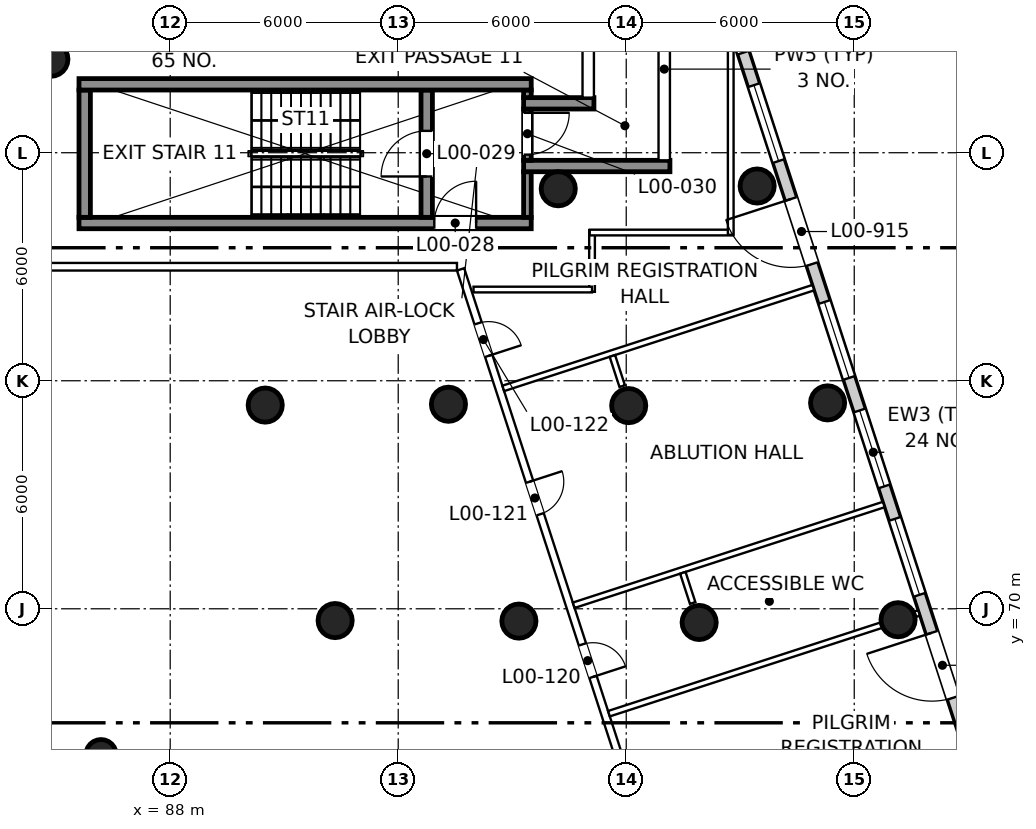
"""IFC4 building model, lengths in metres.
Left out: names, types, materials, properties, quantities, classifications, styles, units other than length and angle.
Written with IfcOpenShell. Run it as: python <this file> out.ifc"""

import sys

from ifc_helpers import new_model, si_unit, direction, frame, frame_2d, origin, origin_2d, place, context, subcontext, project, spatial, rectangle, circle, extrude, element, fill, save


model = new_model("IFC4")
c1 = context("Model", 3, precision=1e-05, world=origin(), true_north=direction((0.0, 1.0)))
c2 = subcontext(c1, "Body", "Model", "MODEL_VIEW")
j1 = project(units=[si_unit("LENGTHUNIT", "METRE"), si_unit("PLANEANGLEUNIT", "RADIAN")], contexts=[c1])
p1 = place(None, origin())
s1 = spatial("IfcSite", under=j1, at=p1, CompositionType="ELEMENT")
p2 = place(p1, origin())
s2 = spatial("IfcBuilding", under=s1, at=p2, CompositionType="ELEMENT")
p3 = place(p2, origin())
s3 = spatial("IfcBuildingStorey", under=s2, at=p3, CompositionType="ELEMENT", Elevation=0.0)
for number, where, z_axis, x_axis in (
    (1, (92.34, 69.69, 0.0), (0.0, 0.0, 1.0), (1.0, 0.0, 0.0)),
    (2, (90.5, 75.36, 0.0), (0.0, 0.0, 1.0), (1.0, 0.0, 0.0)),
    (3, (84.86, 84.46, 0.0), (0.0, 0.0, 1.0), (1.0, 0.0, 0.0)),
):
    element("IfcColumn", number, at=place(p3, frame(where, z_axis=z_axis, x_axis=x_axis)), inside=s3, PredefinedType="COLUMN", context=c2, shape_type="SweptSolid", body=[
        extrude(circle(Radius=0.45, at=origin_2d()), origin(), (0.0, 0.0, 1.0), 9.0),
    ])
p4 = place(p3, frame((86.18, 66.16, 0.0), z_axis=(0.0, 0.0, 1.0), x_axis=(1.0, 0.0, 0.0)))
e4 = element("IfcColumn", 4, at=p4, inside=s3, PredefinedType="COLUMN", context=c2, shape_type="SweptSolid", body=[
    extrude(circle(Radius=0.4, at=origin_2d()), origin(), (0.0, 0.0, 1.0), 9.0),
])
for number, where, z_axis, x_axis in (
    (5, (107.153, 69.712, 0.0), (0.0, 0.0, 1.0), (1.0, 0.0, 0.0)),
    (6, (105.299, 75.418, 0.0), (0.0, 0.0, 1.0), (1.0, 0.0, 0.0)),
    (7, (103.445, 81.124, 0.0), (0.0, 0.0, 1.0), (1.0, 0.0, 0.0)),
    (8, (101.919, 69.64, 0.0), (0.0, 0.0, 1.0), (1.0, 0.0, 0.0)),
    (9, (100.065, 75.346, 0.0), (0.0, 0.0, 1.0), (1.0, 0.0, 0.0)),
    (10, (98.211, 81.052, 0.0), (0.0, 0.0, 1.0), (1.0, 0.0, 0.0)),
    (11, (97.176, 69.676, 0.0), (0.0, 0.0, 1.0), (1.0, 0.0, 0.0)),
    (12, (95.322, 75.382, 0.0), (0.0, 0.0, 1.0), (1.0, 0.0, 0.0)),
):
    element("IfcColumn", number, at=place(p3, frame(where, z_axis=z_axis, x_axis=x_axis)), inside=s3, PredefinedType="COLUMN", context=c2, shape_type="SweptSolid", body=[
        extrude(circle(Radius=0.45, at=origin_2d()), origin(), (0.0, 0.0, 1.0), 9.0),
    ])
p5 = place(p3, frame((110.912, 60.539, 0.0), z_axis=(0.0, 0.0, 1.0), x_axis=(-0.309016476183, 0.951056684666, 0.0)))
e13 = element("IfcWall", 13, at=p5, inside=s3, PredefinedType="SOLIDWALL", context=c2, shape_type="SweptSolid", body=[
    extrude(rectangle(XDim=28.556, YDim=0.32, at=frame_2d((14.278, 0.0))), origin(), (0.0, 0.0, 1.0), 8.65),
])
p6 = place(p5, frame((1.335, 0.0, 0.9)))
e14 = element("IfcOpeningElement", 14, at=p6, cuts=e13, PredefinedType="OPENING", context=c2, shape_type="SweptSolid", body=[
    extrude(rectangle(XDim=2.1, YDim=3.0, at=frame_2d((1.05, 1.5))), frame((0.0, 0.17, 0.0), z_axis=(0.0, -1.0, 0.0), x_axis=(1.0, 0.0, 0.0)), (0.0, 0.0, 1.0), 0.34),
])
p7 = place(p5, frame((4.335, 0.0, 0.9)))
e15 = element("IfcOpeningElement", 15, at=p7, cuts=e13, PredefinedType="OPENING", context=c2, shape_type="SweptSolid", body=[
    extrude(rectangle(XDim=2.1, YDim=3.0, at=frame_2d((1.05, 1.5))), frame((0.0, 0.17, 0.0), z_axis=(0.0, -1.0, 0.0), x_axis=(1.0, 0.0, 0.0)), (0.0, 0.0, 1.0), 0.34),
])
p8 = place(p5, frame((7.485, 0.0, 0.0)))
e16 = element("IfcOpeningElement", 16, at=p8, cuts=e13, PredefinedType="OPENING", context=c2, shape_type="SweptSolid", body=[
    extrude(rectangle(XDim=1.8, YDim=2.4, at=frame_2d((0.9, 1.2))), frame((0.0, 0.17, 0.0), z_axis=(0.0, -1.0, 0.0), x_axis=(1.0, 0.0, 0.0)), (0.0, 0.0, 1.0), 0.34),
])
p9 = place(p5, frame((10.335, 0.0, 0.9)))
e17 = element("IfcOpeningElement", 17, at=p9, cuts=e13, PredefinedType="OPENING", context=c2, shape_type="SweptSolid", body=[
    extrude(rectangle(XDim=2.1, YDim=3.0, at=frame_2d((1.05, 1.5))), frame((0.0, 0.17, 0.0), z_axis=(0.0, -1.0, 0.0), x_axis=(1.0, 0.0, 0.0)), (0.0, 0.0, 1.0), 0.34),
])
p10 = place(p5, frame((13.335, 0.0, 0.9)))
e18 = element("IfcOpeningElement", 18, at=p10, cuts=e13, PredefinedType="OPENING", context=c2, shape_type="SweptSolid", body=[
    extrude(rectangle(XDim=2.1, YDim=3.0, at=frame_2d((1.05, 1.5))), frame((0.0, 0.17, 0.0), z_axis=(0.0, -1.0, 0.0), x_axis=(1.0, 0.0, 0.0)), (0.0, 0.0, 1.0), 0.34),
])
p11 = place(p5, frame((16.335, 0.0, 0.9)))
e19 = element("IfcOpeningElement", 19, at=p11, cuts=e13, PredefinedType="OPENING", context=c2, shape_type="SweptSolid", body=[
    extrude(rectangle(XDim=2.1, YDim=3.0, at=frame_2d((1.05, 1.5))), frame((0.0, 0.17, 0.0), z_axis=(0.0, -1.0, 0.0), x_axis=(1.0, 0.0, 0.0)), (0.0, 0.0, 1.0), 0.34),
])
p12 = place(p5, frame((19.485, 0.0, 0.0)))
e20 = element("IfcOpeningElement", 20, at=p12, cuts=e13, PredefinedType="OPENING", context=c2, shape_type="SweptSolid", body=[
    extrude(rectangle(XDim=1.8, YDim=2.4, at=frame_2d((0.9, 1.2))), frame((0.0, 0.17, 0.0), z_axis=(0.0, -1.0, 0.0), x_axis=(1.0, 0.0, 0.0)), (0.0, 0.0, 1.0), 0.34),
])
p13 = place(p5, frame((22.335, 0.0, 0.9)))
e21 = element("IfcOpeningElement", 21, at=p13, cuts=e13, PredefinedType="OPENING", context=c2, shape_type="SweptSolid", body=[
    extrude(rectangle(XDim=2.1, YDim=3.0, at=frame_2d((1.05, 1.5))), frame((0.0, 0.17, 0.0), z_axis=(0.0, -1.0, 0.0), x_axis=(1.0, 0.0, 0.0)), (0.0, 0.0, 1.0), 0.34),
])
p14 = place(p5, frame((25.335, 0.0, 0.9)))
e22 = element("IfcOpeningElement", 22, at=p14, cuts=e13, PredefinedType="OPENING", context=c2, shape_type="SweptSolid", body=[
    extrude(rectangle(XDim=2.1, YDim=3.0, at=frame_2d((1.05, 1.5))), frame((0.0, 0.17, 0.0), z_axis=(0.0, -1.0, 0.0), x_axis=(1.0, 0.0, 0.0)), (0.0, 0.0, 1.0), 0.34),
])
p15 = place(p3, frame((85.6, 80.15, 0.0), z_axis=(0.0, 0.0, 1.0), x_axis=(1.0, 0.0, 0.0)))
e23 = element("IfcWall", 23, at=p15, inside=s3, PredefinedType="SHEAR", context=c2, shape_type="SweptSolid", body=[
    extrude(rectangle(XDim=11.9, YDim=0.3, at=frame_2d((5.95, 0.0))), origin(), (0.0, 0.0, 1.0), 9.0),
])
p16 = place(p15, frame((9.35, 0.0, 0.0)))
e24 = element("IfcOpeningElement", 24, at=p16, cuts=e23, PredefinedType="OPENING", context=c2, shape_type="SweptSolid", body=[
    extrude(rectangle(XDim=1.1, YDim=2.1, at=frame_2d((0.55, 1.05))), frame((0.0, 0.16, 0.0), z_axis=(0.0, -1.0, 0.0), x_axis=(1.0, 0.0, 0.0)), (0.0, 0.0, 1.0), 0.32),
])
p17 = place(p3, frame((85.75, 80.3, 0.0), z_axis=(0.0, 0.0, 1.0), x_axis=(0.0, 1.0, 0.0)))
e25 = element("IfcWall", 25, at=p17, inside=s3, PredefinedType="SHEAR", context=c2, shape_type="SweptSolid", body=[
    extrude(rectangle(XDim=3.35, YDim=0.3, at=frame_2d((1.675, 0.0))), origin(), (0.0, 0.0, 1.0), 9.0),
])
p18 = place(p3, frame((94.75, 80.3, 0.0), z_axis=(0.0, 0.0, 1.0), x_axis=(0.0, 1.0, 0.0)))
e26 = element("IfcWall", 26, at=p18, inside=s3, PredefinedType="SHEAR", context=c2, shape_type="SweptSolid", body=[
    extrude(rectangle(XDim=3.35, YDim=0.3, at=frame_2d((1.675, 0.0))), origin(), (0.0, 0.0, 1.0), 9.0),
])
p19 = place(p18, frame((1.075, 0.0, 0.0)))
e27 = element("IfcOpeningElement", 27, at=p19, cuts=e26, PredefinedType="OPENING", context=c2, shape_type="SweptSolid", body=[
    extrude(rectangle(XDim=1.2, YDim=2.1, at=frame_2d((0.6, 1.05))), frame((0.0, 0.16, 0.0), z_axis=(0.0, -1.0, 0.0), x_axis=(1.0, 0.0, 0.0)), (0.0, 0.0, 1.0), 0.32),
])
p20 = place(p3, frame((97.4, 80.3, 0.0), z_axis=(0.0, 0.0, 1.0), x_axis=(0.0, 1.0, 0.0)))
e28 = element("IfcWall", 28, at=p20, inside=s3, PredefinedType="SHEAR", context=c2, shape_type="SweptSolid", body=[
    extrude(rectangle(XDim=1.2, YDim=0.2, at=frame_2d((0.6, 0.0))), origin(), (0.0, 0.0, 1.0), 9.0),
])
p21 = place(p3, frame((97.3, 81.65, 0.0), z_axis=(0.0, 0.0, 1.0), x_axis=(1.0, 0.0, 0.0)))
e29 = element("IfcWall", 29, at=p21, inside=s3, PredefinedType="SHEAR", context=c2, shape_type="SweptSolid", body=[
    extrude(rectangle(XDim=3.85, YDim=0.3, at=frame_2d((1.925, 0.0))), origin(), (0.0, 0.0, 1.0), 9.0),
])
p22 = place(p3, frame((97.4, 81.8, 0.0), z_axis=(0.0, 0.0, 1.0), x_axis=(0.0, 1.0, 0.0)))
e30 = element("IfcWall", 30, at=p22, inside=s3, PredefinedType="SHEAR", context=c2, shape_type="SweptSolid", body=[
    extrude(rectangle(XDim=1.35, YDim=0.2, at=frame_2d((0.675, 0.0))), origin(), (0.0, 0.0, 1.0), 9.0),
])
p23 = place(p22, frame((0.15, 0.0, 0.0)))
e31 = element("IfcOpeningElement", 31, at=p23, cuts=e30, PredefinedType="OPENING", context=c2, shape_type="SweptSolid", body=[
    extrude(rectangle(XDim=1.1, YDim=2.1, at=frame_2d((0.55, 1.05))), frame((0.0, 0.11, 0.0), z_axis=(0.0, -1.0, 0.0), x_axis=(1.0, 0.0, 0.0)), (0.0, 0.0, 1.0), 0.22),
])
p24 = place(p3, frame((101.0, 81.8, 0.0), z_axis=(0.0, 0.0, 1.0), x_axis=(0.0, 1.0, 0.0)))
e32 = element("IfcWall", 32, at=p24, inside=s3, PredefinedType="PARTITIONING", context=c2, shape_type="SweptSolid", body=[
    extrude(rectangle(XDim=4.8, YDim=0.3, at=frame_2d((2.4, 0.0))), origin(), (0.0, 0.0, 1.0), 8.65),
])
p25 = place(p3, frame((97.3, 83.3, 0.0), z_axis=(0.0, 0.0, 1.0), x_axis=(1.0, 0.0, 0.0)))
e33 = element("IfcWall", 33, at=p25, inside=s3, PredefinedType="SHEAR", context=c2, shape_type="SweptSolid", body=[
    extrude(rectangle(XDim=1.85, YDim=0.3, at=frame_2d((0.925, 0.0))), origin(), (0.0, 0.0, 1.0), 9.0),
])
p26 = place(p3, frame((97.3, 83.55, 0.0), z_axis=(0.0, 0.0, 1.0), x_axis=(1.0, 0.0, 0.0)))
e34 = element("IfcWall", 34, at=p26, inside=s3, PredefinedType="SHEAR", context=c2, shape_type="SweptSolid", body=[
    extrude(rectangle(XDim=0.2, YDim=0.2, at=frame_2d((0.1, 0.0))), origin(), (0.0, 0.0, 1.0), 9.0),
])
p27 = place(p3, frame((99.0, 83.45, 0.0), z_axis=(0.0, 0.0, 1.0), x_axis=(0.0, 1.0, 0.0)))
e35 = element("IfcWall", 35, at=p27, inside=s3, PredefinedType="PARTITIONING", context=c2, shape_type="SweptSolid", body=[
    extrude(rectangle(XDim=3.15, YDim=0.3, at=frame_2d((1.575, 0.0))), origin(), (0.0, 0.0, 1.0), 8.65),
])
p28 = place(p3, frame((85.6, 83.8, 0.0), z_axis=(0.0, 0.0, 1.0), x_axis=(1.0, 0.0, 0.0)))
e36 = element("IfcWall", 36, at=p28, inside=s3, PredefinedType="SHEAR", context=c2, shape_type="SweptSolid", body=[
    extrude(rectangle(XDim=11.9, YDim=0.3, at=frame_2d((5.95, 0.0))), origin(), (0.0, 0.0, 1.0), 9.0),
])
p29 = place(p3, frame((83.2, 79.0, 0.0), z_axis=(0.0, 0.0, 1.0), x_axis=(1.0, 0.0, 0.0)))
e37 = element("IfcWall", 37, at=p29, inside=s3, PredefinedType="PARTITIONING", context=c2, shape_type="SweptSolid", body=[
    extrude(rectangle(XDim=12.346, YDim=0.2, at=frame_2d((6.173, 0.0))), origin(), (0.0, 0.0, 1.0), 7.95),
])
p30 = place(p3, frame((95.641, 78.931, 0.0), z_axis=(0.0, 0.0, 1.0), x_axis=(0.309013160516, -0.951057761983, 0.0)))
e38 = element("IfcWall", 38, at=p30, inside=s3, PredefinedType="PARTITIONING", context=c2, shape_type="SweptSolid", body=[
    extrude(rectangle(XDim=17.717, YDim=0.2, at=frame_2d((8.859, 0.0))), origin(), (0.0, 0.0, 1.0), 8.65),
])
p31 = place(p30, frame((13.799, 0.0, 0.0)))
e39 = element("IfcOpeningElement", 39, at=p31, cuts=e38, PredefinedType="OPENING", context=c2, shape_type="SweptSolid", body=[
    extrude(rectangle(XDim=0.9, YDim=2.1, at=frame_2d((0.45, 1.05))), frame((0.0, 0.11, 0.0), z_axis=(0.0, -1.0, 0.0), x_axis=(1.0, 0.0, 0.0)), (0.0, 0.0, 1.0), 0.22),
])
p32 = place(p30, frame((10.375, 0.0, 0.0)))
e40 = element("IfcOpeningElement", 40, at=p32, cuts=e38, PredefinedType="OPENING", context=c2, shape_type="SweptSolid", body=[
    extrude(rectangle(XDim=0.9, YDim=2.1, at=frame_2d((0.45, 1.05))), frame((0.0, 0.11, 0.0), z_axis=(0.0, -1.0, 0.0), x_axis=(1.0, 0.0, 0.0)), (0.0, 0.0, 1.0), 0.22),
])
p33 = place(p30, frame((5.875, 0.0, 0.0)))
e41 = element("IfcOpeningElement", 41, at=p33, cuts=e38, PredefinedType="OPENING", context=c2, shape_type="SweptSolid", body=[
    extrude(rectangle(XDim=0.9, YDim=2.1, at=frame_2d((0.45, 1.05))), frame((0.0, 0.11, 0.0), z_axis=(0.0, -1.0, 0.0), x_axis=(1.0, 0.0, 0.0)), (0.0, 0.0, 1.0), 0.22),
])
p34 = place(p30, frame((1.492, 0.0, 0.0)))
e42 = element("IfcOpeningElement", 42, at=p34, cuts=e38, PredefinedType="OPENING", context=c2, shape_type="SweptSolid", body=[
    extrude(rectangle(XDim=0.9, YDim=2.1, at=frame_2d((0.45, 1.05))), frame((0.0, 0.11, 0.0), z_axis=(0.0, -1.0, 0.0), x_axis=(1.0, 0.0, 0.0)), (0.0, 0.0, 1.0), 0.22),
])
for number, where, z_axis, x_axis in (
    (43, (107.705, 69.891, 0.0), (0.0, 0.0, 1.0), (-0.951, -0.309, 0.0)),
    (44, (106.778, 72.744, 0.0), (0.0, 0.0, 1.0), (-0.951, -0.309, 0.0)),
):
    element("IfcWall", number, at=place(p3, frame(where, z_axis=z_axis, x_axis=x_axis)), inside=s3, PredefinedType="PARTITIONING", context=c2, shape_type="SweptSolid", body=[
        extrude(rectangle(XDim=8.58, YDim=0.15, at=frame_2d((4.29, 0.0))), origin(), (0.0, 0.0, 1.0), 7.95),
    ])
p35 = place(p3, frame((104.924, 78.45, 0.0), z_axis=(0.0, 0.0, 1.0), x_axis=(-0.951054768527, -0.309022373402, 0.0)))
e45 = element("IfcWall", 45, at=p35, inside=s3, PredefinedType="PARTITIONING", context=c2, shape_type="SweptSolid", body=[
    extrude(rectangle(XDim=8.58, YDim=0.15, at=frame_2d((4.29, 0.0))), origin(), (0.0, 0.0, 1.0), 7.95),
])
p36 = place(p3, frame((101.748, 70.152, 0.0), z_axis=(0.0, 0.0, 1.0), x_axis=(-0.309033234433, 0.951051239427, 0.0)))
e46 = element("IfcWall", 46, at=p36, inside=s3, PredefinedType="PARTITIONING", context=c2, shape_type="SweptSolid", body=[
    extrude(rectangle(XDim=0.836, YDim=0.15, at=frame_2d((0.418, 0.0))), origin(), (0.0, 0.0, 1.0), 7.95),
])
p37 = place(p3, frame((99.894, 75.858, 0.0), z_axis=(0.0, 0.0, 1.0), x_axis=(-0.308947409325, 0.951079123034, 0.0)))
e47 = element("IfcWall", 47, at=p37, inside=s3, PredefinedType="PARTITIONING", context=c2, shape_type="SweptSolid", body=[
    extrude(rectangle(XDim=0.836, YDim=0.15, at=frame_2d((0.418, 0.0))), origin(), (0.0, 0.0, 1.0), 7.95),
])
p38 = place(p3, frame((99.1, 78.34, 0.0), z_axis=(0.0, 0.0, 1.0), x_axis=(0.0, 1.0, 0.0)))
e48 = element("IfcWall", 48, at=p38, inside=s3, PredefinedType="PARTITIONING", context=c2, shape_type="SweptSolid", body=[
    extrude(rectangle(XDim=1.62, YDim=0.15, at=frame_2d((0.81, 0.0))), origin(), (0.0, 0.0, 1.0), 7.95),
])
p39 = place(p3, frame((99.04, 79.9, 0.0), z_axis=(0.0, 0.0, 1.0), x_axis=(1.0, 0.0, 0.0)))
e49 = element("IfcWall", 49, at=p39, inside=s3, PredefinedType="PARTITIONING", context=c2, shape_type="SweptSolid", body=[
    extrude(rectangle(XDim=3.77, YDim=0.15, at=frame_2d((1.885, 0.0))), origin(), (0.0, 0.0, 1.0), 8.65),
])
p40 = place(p3, frame((102.75, 79.84, 0.0), z_axis=(0.0, 0.0, 1.0), x_axis=(0.0, 1.0, 0.0)))
e50 = element("IfcWall", 50, at=p40, inside=s3, PredefinedType="PARTITIONING", context=c2, shape_type="SweptSolid", body=[
    extrude(rectangle(XDim=4.94, YDim=0.15, at=frame_2d((2.47, 0.0))), origin(), (0.0, 0.0, 1.0), 7.95),
])
p41 = place(p3, frame((95.982, 78.4, 0.0), z_axis=(0.0, 0.0, 1.0), x_axis=(1.0, 0.0, 0.0)))
e51 = element("IfcWall", 51, at=p41, inside=s3, PredefinedType="PARTITIONING", context=c2, shape_type="SweptSolid", body=[
    extrude(rectangle(XDim=3.118, YDim=0.15, at=frame_2d((1.559, 0.0))), origin(), (0.0, 0.0, 1.0), 7.95),
])
p42 = place(p8, origin())
e52 = element("IfcDoor", 52, at=p42, inside=s3, OperationType="DOUBLE_DOOR_DOUBLE_SWING", PredefinedType="DOOR", context=c2, shape_type="SweptSolid", body=[
    extrude(rectangle(XDim=1.8, YDim=2.4, at=frame_2d((0.9, 1.2))), frame((0.0, 0.04, 0.0), z_axis=(0.0, -1.0, 0.0), x_axis=(1.0, 0.0, 0.0)), (0.0, 0.0, 1.0), 0.05),
])
fill(e16, e52)
p43 = place(p9, origin())
e53 = element("IfcWindow", 53, at=p43, inside=s3, PartitioningType="SINGLE_PANEL", PredefinedType="WINDOW", context=c2, shape_type="SweptSolid", body=[
    extrude(rectangle(XDim=2.1, YDim=3.0, at=frame_2d((1.05, 1.5))), frame((0.0, 0.07, 0.0), z_axis=(0.0, -1.0, 0.0), x_axis=(1.0, 0.0, 0.0)), (0.0, 0.0, 1.0), 0.06),
])
fill(e17, e53)
p44 = place(p10, origin())
e54 = element("IfcWindow", 54, at=p44, inside=s3, PartitioningType="SINGLE_PANEL", PredefinedType="WINDOW", context=c2, shape_type="SweptSolid", body=[
    extrude(rectangle(XDim=2.1, YDim=3.0, at=frame_2d((1.05, 1.5))), frame((0.0, 0.07, 0.0), z_axis=(0.0, -1.0, 0.0), x_axis=(1.0, 0.0, 0.0)), (0.0, 0.0, 1.0), 0.06),
])
fill(e18, e54)
p45 = place(p11, origin())
e55 = element("IfcWindow", 55, at=p45, inside=s3, PartitioningType="SINGLE_PANEL", PredefinedType="WINDOW", context=c2, shape_type="SweptSolid", body=[
    extrude(rectangle(XDim=2.1, YDim=3.0, at=frame_2d((1.05, 1.5))), frame((0.0, 0.07, 0.0), z_axis=(0.0, -1.0, 0.0), x_axis=(1.0, 0.0, 0.0)), (0.0, 0.0, 1.0), 0.06),
])
fill(e19, e55)
p46 = place(p12, origin())
e56 = element("IfcDoor", 56, at=p46, inside=s3, OperationType="DOUBLE_DOOR_DOUBLE_SWING", PredefinedType="DOOR", context=c2, shape_type="SweptSolid", body=[
    extrude(rectangle(XDim=1.8, YDim=2.4, at=frame_2d((0.9, 1.2))), frame((0.0, 0.04, 0.0), z_axis=(0.0, -1.0, 0.0), x_axis=(1.0, 0.0, 0.0)), (0.0, 0.0, 1.0), 0.05),
])
fill(e20, e56)
p47 = place(p13, origin())
e57 = element("IfcWindow", 57, at=p47, inside=s3, PartitioningType="SINGLE_PANEL", PredefinedType="WINDOW", context=c2, shape_type="SweptSolid", body=[
    extrude(rectangle(XDim=2.1, YDim=3.0, at=frame_2d((1.05, 1.5))), frame((0.0, 0.07, 0.0), z_axis=(0.0, -1.0, 0.0), x_axis=(1.0, 0.0, 0.0)), (0.0, 0.0, 1.0), 0.06),
])
fill(e21, e57)
p48 = place(p14, origin())
e58 = element("IfcWindow", 58, at=p48, inside=s3, PartitioningType="SINGLE_PANEL", PredefinedType="WINDOW", context=c2, shape_type="SweptSolid", body=[
    extrude(rectangle(XDim=2.1, YDim=3.0, at=frame_2d((1.05, 1.5))), frame((0.0, 0.07, 0.0), z_axis=(0.0, -1.0, 0.0), x_axis=(1.0, 0.0, 0.0)), (0.0, 0.0, 1.0), 0.06),
])
fill(e22, e58)
p49 = place(p16, origin())
e59 = element("IfcDoor", 59, at=p49, inside=s3, OperationType="SINGLE_SWING_RIGHT", PredefinedType="DOOR", context=c2, shape_type="SweptSolid", body=[
    extrude(rectangle(XDim=1.1, YDim=2.1, at=frame_2d((0.55, 1.05))), frame((0.0, 0.025, 0.0), z_axis=(0.0, -1.0, 0.0), x_axis=(1.0, 0.0, 0.0)), (0.0, 0.0, 1.0), 0.05),
])
fill(e24, e59)
p50 = place(p19, origin())
e60 = element("IfcDoor", 60, at=p50, inside=s3, OperationType="SINGLE_SWING_LEFT", PredefinedType="DOOR", context=c2, shape_type="SweptSolid", body=[
    extrude(rectangle(XDim=1.2, YDim=2.1, at=frame_2d((0.6, 1.05))), frame((0.0, 0.025, 0.0), z_axis=(0.0, -1.0, 0.0), x_axis=(1.0, 0.0, 0.0)), (0.0, 0.0, 1.0), 0.05),
])
fill(e27, e60)
p51 = place(p23, frame((1.1, 0.0, 0.0), z_axis=(0.0, 0.0, 1.0), x_axis=(-1.0, 0.0, 0.0)))
e61 = element("IfcDoor", 61, at=p51, inside=s3, OperationType="SINGLE_SWING_LEFT", PredefinedType="DOOR", context=c2, shape_type="SweptSolid", body=[
    extrude(rectangle(XDim=1.1, YDim=2.1, at=frame_2d((0.55, 1.05))), frame((0.0, 0.025, 0.0), z_axis=(0.0, -1.0, 0.0), x_axis=(1.0, 0.0, 0.0)), (0.0, 0.0, 1.0), 0.05),
])
fill(e31, e61)
p52 = place(p32, origin())
e62 = element("IfcDoor", 62, at=p52, inside=s3, OperationType="SINGLE_SWING_RIGHT", PredefinedType="DOOR", context=c2, shape_type="SweptSolid", body=[
    extrude(rectangle(XDim=0.9, YDim=2.1, at=frame_2d((0.45, 1.05))), frame((0.0, 0.025, 0.0), z_axis=(0.0, -1.0, 0.0), x_axis=(1.0, 0.0, 0.0)), (0.0, 0.0, 1.0), 0.05),
])
fill(e40, e62)
p53 = place(p33, origin())
e63 = element("IfcDoor", 63, at=p53, inside=s3, OperationType="SINGLE_SWING_LEFT", PredefinedType="DOOR", context=c2, shape_type="SweptSolid", body=[
    extrude(rectangle(XDim=0.9, YDim=2.1, at=frame_2d((0.45, 1.05))), frame((0.0, 0.025, 0.0), z_axis=(0.0, -1.0, 0.0), x_axis=(1.0, 0.0, 0.0)), (0.0, 0.0, 1.0), 0.05),
])
fill(e41, e63)
p54 = place(p34, origin())
e64 = element("IfcDoor", 64, at=p54, inside=s3, OperationType="SINGLE_SWING_RIGHT", PredefinedType="DOOR", context=c2, shape_type="SweptSolid", body=[
    extrude(rectangle(XDim=0.9, YDim=2.1, at=frame_2d((0.45, 1.05))), frame((0.0, 0.025, 0.0), z_axis=(0.0, -1.0, 0.0), x_axis=(1.0, 0.0, 0.0)), (0.0, 0.0, 1.0), 0.05),
])
fill(e42, e64)
save(model, sys.argv[1])
